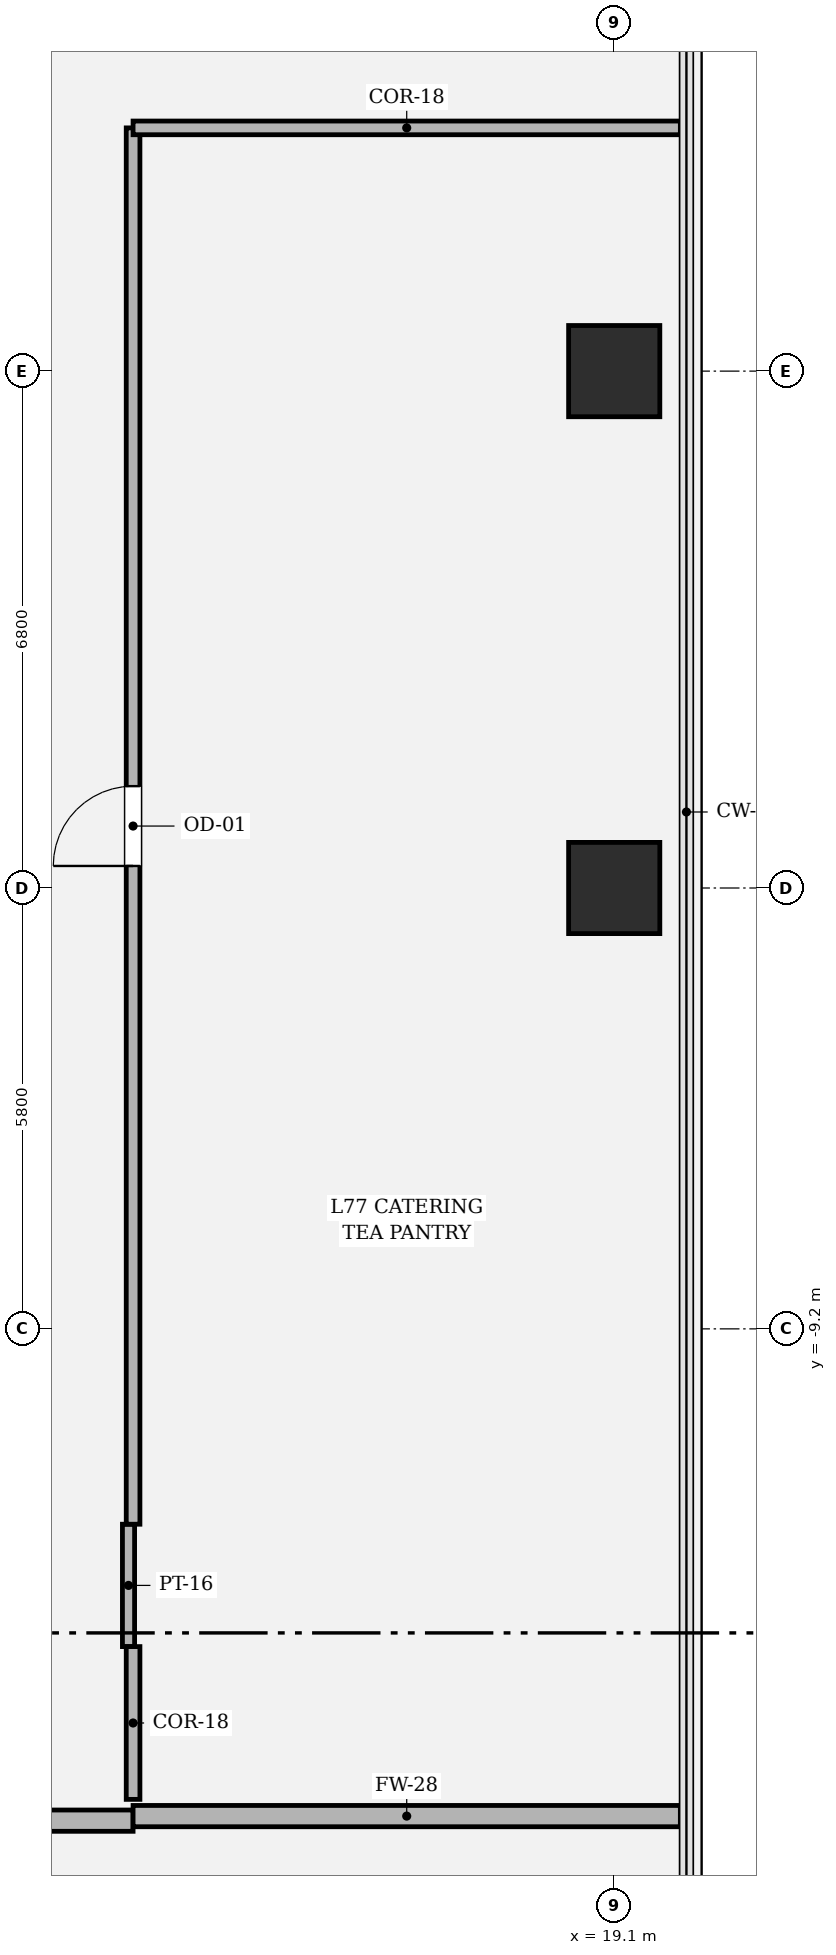
"""IFC4 building model, lengths in metres.
Left out: names, types, materials, properties, quantities, classifications, styles, units other than length and angle.
Written with IfcOpenShell. Run it as: python <this file> out.ifc"""

import sys

from ifc_helpers import new_model, si_unit, direction, frame, frame_2d, origin, origin_2d, place, context, subcontext, project, spatial, rectangle, hollow_rectangle, extrude, element, fill, save


model = new_model("IFC4")
c1 = context("Model", 3, precision=1e-05, world=origin(), true_north=direction((0.0, 1.0)))
c2 = subcontext(c1, "Body", "Model", "MODEL_VIEW")
j1 = project(units=[si_unit("LENGTHUNIT", "METRE"), si_unit("PLANEANGLEUNIT", "RADIAN")], contexts=[c1])
p1 = place(None, origin())
s1 = spatial("IfcSite", under=j1, at=p1, CompositionType="ELEMENT")
p2 = place(p1, origin())
s2 = spatial("IfcBuilding", under=s1, at=p2, CompositionType="ELEMENT")
p3 = place(p2, frame((0.0, 0.0, 325.8)))
s3 = spatial("IfcBuildingStorey", under=s2, at=p3, CompositionType="ELEMENT", Elevation=325.8)
for number, where, z_axis, x_axis in (
    (1, (19.1, -3.4, 0.0), (0.0, 0.0, 1.0), (1.0, 0.0, 0.0)),
    (2, (19.1, 3.4, 0.0), (0.0, 0.0, 1.0), (1.0, 0.0, 0.0)),
):
    element("IfcColumn", number, at=place(p3, frame(where, z_axis=z_axis, x_axis=x_axis)), inside=s3, PredefinedType="COLUMN", context=c2, shape_type="SweptSolid", body=[
        extrude(hollow_rectangle(XDim=1.2, YDim=1.2, WallThickness=0.035, at=origin_2d()), origin(), (0.0, 0.0, 1.0), 4.2),
    ])
p4 = place(p3, frame((-12.77, -15.67, 0.0), z_axis=(0.0, 0.0, 1.0), x_axis=(1.0, 0.0, 0.0)))
e3 = element("IfcWall", 3, at=p4, inside=s3, PredefinedType="SOLIDWALL", context=c2, shape_type="SweptSolid", body=[
    extrude(rectangle(XDim=25.54, YDim=0.28, at=frame_2d((12.77, 0.0))), origin(), (0.0, 0.0, 1.0), 3.394),
])
p5 = place(p4, frame((11.92, 0.0, 0.0)))
e4 = element("IfcOpeningElement", 4, at=p5, cuts=e3, PredefinedType="OPENING", context=c2, shape_type="SweptSolid", body=[
    extrude(rectangle(XDim=1.7, YDim=2.3, at=frame_2d((0.85, 1.15))), frame((0.0, 0.15, 0.0), z_axis=(0.0, -1.0, 0.0), x_axis=(1.0, 0.0, 0.0)), (0.0, 0.0, 1.0), 0.3),
])
p6 = place(p3, frame((12.77, -15.61, 0.0), z_axis=(0.0, 0.0, 1.0), x_axis=(1.0, 0.0, 0.0)))
e5 = element("IfcWall", 5, at=p6, inside=s3, PredefinedType="SOLIDWALL", context=c2, shape_type="SweptSolid", body=[
    extrude(rectangle(XDim=7.2, YDim=0.28, at=frame_2d((3.6, 0.0))), origin(), (0.0, 0.0, 1.0), 3.394),
])
p7 = place(p3, frame((12.71, -13.38, 0.0), z_axis=(0.0, 0.0, 1.0), x_axis=(0.0, 1.0, 0.0)))
e6 = element("IfcWall", 6, at=p7, inside=s3, PredefinedType="PARTITIONING", context=c2, shape_type="SweptSolid", body=[
    extrude(rectangle(XDim=1.61, YDim=0.16, at=frame_2d((0.805, 0.0))), origin(), (0.0, 0.0, 1.0), 3.634),
])
p8 = place(p3, frame((12.77, -11.77, 0.0), z_axis=(0.0, 0.0, 1.0), x_axis=(0.0, 1.0, 0.0)))
e7 = element("IfcWall", 7, at=p8, inside=s3, PredefinedType="PARTITIONING", context=c2, shape_type="SweptSolid", body=[
    extrude(rectangle(XDim=18.37, YDim=0.18, at=frame_2d((9.185, 0.0))), origin(), (0.0, 0.0, 1.0), 3.394),
])
p9 = place(p8, frame((8.66, 0.0, 0.0)))
e8 = element("IfcOpeningElement", 8, at=p9, cuts=e7, PredefinedType="OPENING", context=c2, shape_type="SweptSolid", body=[
    extrude(rectangle(XDim=1.05, YDim=2.2, at=frame_2d((0.525, 1.1))), frame((0.0, 0.1, 0.0), z_axis=(0.0, -1.0, 0.0), x_axis=(1.0, 0.0, 0.0)), (0.0, 0.0, 1.0), 0.2),
])
p10 = place(p3, frame((12.77, 6.6, 0.0), z_axis=(0.0, 0.0, 1.0), x_axis=(1.0, 0.0, 0.0)))
e9 = element("IfcWall", 9, at=p10, inside=s3, PredefinedType="PARTITIONING", context=c2, shape_type="SweptSolid", body=[
    extrude(rectangle(XDim=7.2, YDim=0.18, at=frame_2d((3.6, 0.0))), origin(), (0.0, 0.0, 1.0), 3.394),
])
p11 = place(p3, frame((12.77, -15.39, 0.0), z_axis=(0.0, 0.0, 1.0), x_axis=(0.0, 1.0, 0.0)))
e10 = element("IfcWall", 10, at=p11, inside=s3, PredefinedType="PARTITIONING", context=c2, shape_type="SweptSolid", body=[
    extrude(rectangle(XDim=2.01, YDim=0.18, at=frame_2d((1.005, 0.0))), origin(), (0.0, 0.0, 1.0), 3.634),
])
p12 = place(p9, origin())
e11 = element("IfcDoor", 11, at=p12, inside=s3, OperationType="SINGLE_SWING_LEFT", PredefinedType="DOOR", context=c2, shape_type="SweptSolid", body=[
    extrude(rectangle(XDim=1.05, YDim=2.2, at=frame_2d((0.525, 1.1))), frame((0.0, 0.025, 0.0), z_axis=(0.0, -1.0, 0.0), x_axis=(1.0, 0.0, 0.0)), (0.0, 0.0, 1.0), 0.05),
])
fill(e8, e11)
save(model, sys.argv[1])
